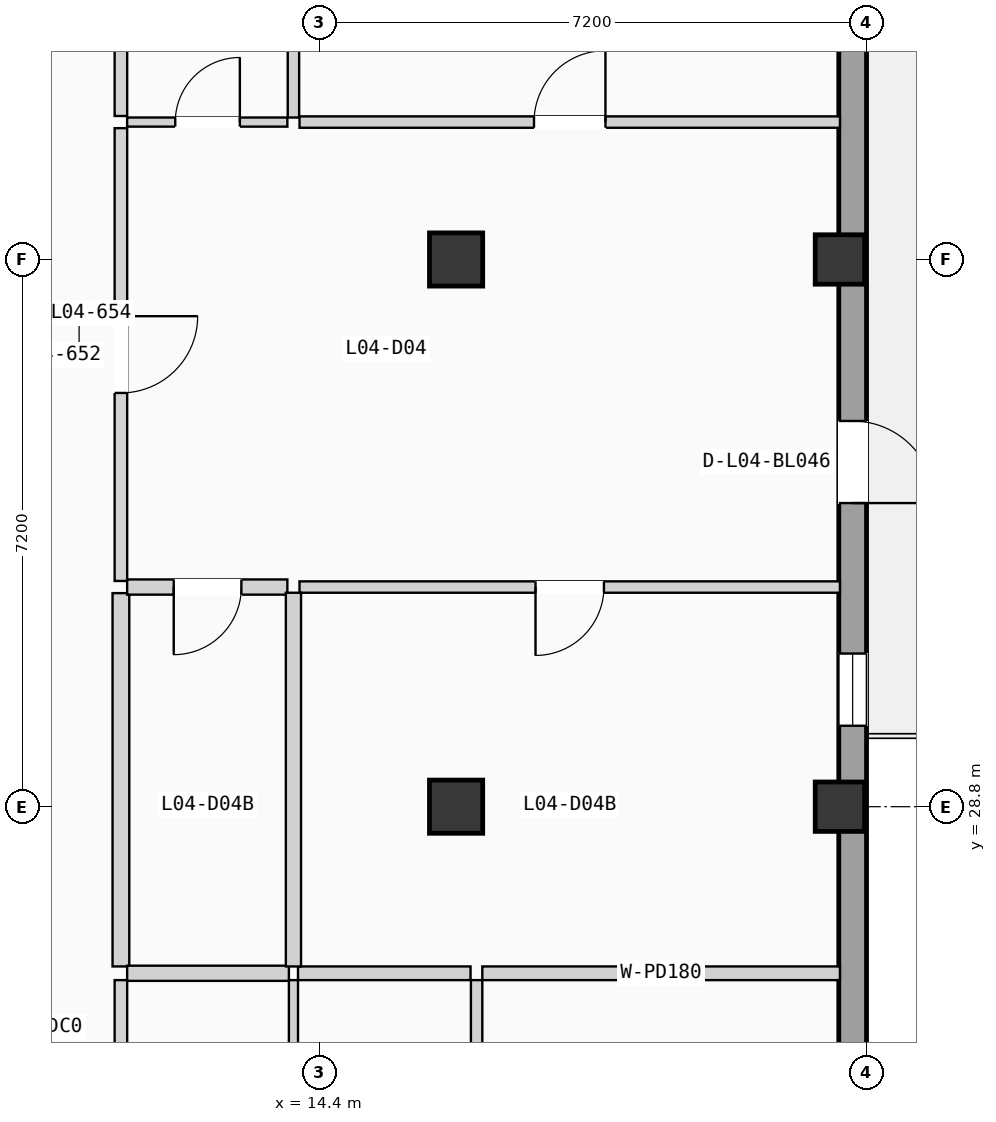
"""IFC4 building model, lengths in metres.
Left out: names, types, materials, properties, quantities, classifications, styles, units other than length and angle.
Written with IfcOpenShell. Run it as: python <this file> out.ifc"""

import sys

from ifc_helpers import new_model, si_unit, direction, frame, frame_2d, origin, origin_2d, place, context, subcontext, project, spatial, rectangle, extrude, element, fill, save


model = new_model("IFC4")
c1 = context("Model", 3, precision=1e-05, world=origin(), true_north=direction((0.0, 1.0)))
c2 = subcontext(c1, "Body", "Model", "MODEL_VIEW")
j1 = project(units=[si_unit("LENGTHUNIT", "METRE"), si_unit("PLANEANGLEUNIT", "RADIAN")], contexts=[c1])
p1 = place(None, origin())
s1 = spatial("IfcSite", under=j1, at=p1, CompositionType="ELEMENT")
p2 = place(p1, origin())
s2 = spatial("IfcBuilding", under=s1, at=p2, CompositionType="ELEMENT")
p3 = place(p2, frame((0.0, 0.0, 15.225)))
s3 = spatial("IfcBuildingStorey", under=s2, at=p3, CompositionType="ELEMENT", Elevation=15.225)
for number, where, z_axis, x_axis in (
    (1, (16.2, 28.8, 0.0), (0.0, 0.0, 1.0), (1.0, 0.0, 0.0)),
    (2, (16.2, 36.0, 0.0), (0.0, 0.0, 1.0), (1.0, 0.0, 0.0)),
):
    element("IfcColumn", number, at=place(p3, frame(where, z_axis=z_axis, x_axis=x_axis)), inside=s3, PredefinedType="COLUMN", context=c2, shape_type="SweptSolid", body=[
        extrude(rectangle(XDim=0.7, YDim=0.7, at=origin_2d()), origin(), (0.0, 0.0, 1.0), 3.15),
    ])
for number, where, z_axis, x_axis in (
    (3, (21.25, 28.8, 0.0), (0.0, 0.0, 1.0), (1.0, 0.0, 0.0)),
    (4, (21.25, 36.0, 0.0), (0.0, 0.0, 1.0), (1.0, 0.0, 0.0)),
):
    element("IfcColumn", number, at=place(p3, frame(where, z_axis=z_axis, x_axis=x_axis)), inside=s3, PredefinedType="COLUMN", context=c2, shape_type="SweptSolid", body=[
        extrude(rectangle(XDim=0.65, YDim=0.65, at=origin_2d()), origin(), (0.0, 0.0, 1.0), 3.15),
    ])
p4 = place(p3, frame((21.417, 0.365, 0.0), z_axis=(0.0, 0.0, 1.0), x_axis=(0.0, 1.0, 0.0)))
e5 = element("IfcWall", 5, at=p4, inside=s3, PredefinedType="SOLIDWALL", context=c2, shape_type="SweptSolid", body=[
    extrude(rectangle(XDim=49.67, YDim=0.365, at=frame_2d((24.835, 0.0))), origin(), (0.0, 0.0, 1.0), 2.89),
])
p5 = place(p4, frame((16.335, 0.0, 0.0)))
e6 = element("IfcOpeningElement", 6, at=p5, cuts=e5, PredefinedType="OPENING", context=c2, shape_type="SweptSolid", body=[
    extrude(rectangle(XDim=0.95, YDim=2.15, at=frame_2d((0.475, 1.075))), frame((0.0, 0.192, 0.0), z_axis=(0.0, -1.0, 0.0), x_axis=(1.0, 0.0, 0.0)), (0.0, 0.0, 1.0), 0.385),
])
p6 = place(p4, frame((9.053, 0.0, 0.9)))
e7 = element("IfcOpeningElement", 7, at=p6, cuts=e5, PredefinedType="OPENING", context=c2, shape_type="SweptSolid", body=[
    extrude(rectangle(XDim=2.15, YDim=1.2, at=frame_2d((1.075, 0.6))), frame((0.0, 0.192, 0.0), z_axis=(0.0, -1.0, 0.0), x_axis=(1.0, 0.0, 0.0)), (0.0, 0.0, 1.0), 0.385),
])
p7 = place(p4, frame((22.754, 0.0, 0.855)))
e8 = element("IfcOpeningElement", 8, at=p7, cuts=e5, PredefinedType="OPENING", context=c2, shape_type="SweptSolid", body=[
    extrude(rectangle(XDim=2.15, YDim=1.35, at=frame_2d((1.075, 0.675))), frame((0.0, 0.192, 0.0), z_axis=(0.0, -1.0, 0.0), x_axis=(1.0, 0.0, 0.0)), (0.0, 0.0, 1.0), 0.385),
])
p8 = place(p4, frame((32.43, 0.0, 0.0)))
e9 = element("IfcOpeningElement", 9, at=p8, cuts=e5, PredefinedType="OPENING", context=c2, shape_type="SweptSolid", body=[
    extrude(rectangle(XDim=1.08, YDim=2.18, at=frame_2d((0.54, 1.09))), frame((0.0, 0.192, 0.0), z_axis=(0.0, -1.0, 0.0), x_axis=(1.0, 0.0, 0.0)), (0.0, 0.0, 1.0), 0.385),
])
p9 = place(p4, frame((29.5, 0.0, 0.85)))
e10 = element("IfcOpeningElement", 10, at=p9, cuts=e5, PredefinedType="OPENING", context=c2, shape_type="SweptSolid", body=[
    extrude(rectangle(XDim=0.95, YDim=1.2, at=frame_2d((0.475, 0.6))), frame((0.0, 0.192, 0.0), z_axis=(0.0, -1.0, 0.0), x_axis=(1.0, 0.0, 0.0)), (0.0, 0.0, 1.0), 0.385),
])
p10 = place(p4, frame((38.904, 0.0, 0.555)))
e11 = element("IfcOpeningElement", 11, at=p10, cuts=e5, PredefinedType="OPENING", context=c2, shape_type="SweptSolid", body=[
    extrude(rectangle(XDim=2.15, YDim=1.65, at=frame_2d((1.075, 0.825))), frame((0.0, 0.192, 0.0), z_axis=(0.0, -1.0, 0.0), x_axis=(1.0, 0.0, 0.0)), (0.0, 0.0, 1.0), 0.385),
])
p11 = place(p3, frame((11.79, 20.733, 0.0), z_axis=(0.0, 0.0, 1.0), x_axis=(0.0, 1.0, 0.0)))
e12 = element("IfcWall", 12, at=p11, inside=s3, PredefinedType="PARTITIONING", context=c2, shape_type="SweptSolid", body=[
    extrude(rectangle(XDim=5.785, YDim=0.165, at=frame_2d((2.893, 0.0))), origin(), (0.0, 0.0, 1.0), 2.87),
])
p12 = place(p3, frame((11.79, 31.77, 0.0), z_axis=(0.0, 0.0, 1.0), x_axis=(0.0, 1.0, 0.0)))
e13 = element("IfcWall", 13, at=p12, inside=s3, PredefinedType="PARTITIONING", context=c2, shape_type="SweptSolid", body=[
    extrude(rectangle(XDim=5.958, YDim=0.165, at=frame_2d((2.979, 0.0))), origin(), (0.0, 0.0, 1.0), 2.87),
])
p13 = place(p12, frame((2.474, 0.0, 0.0)))
e14 = element("IfcOpeningElement", 14, at=p13, cuts=e13, PredefinedType="OPENING", context=c2, shape_type="SweptSolid", body=[
    extrude(rectangle(XDim=1.01, YDim=2.11, at=frame_2d((0.505, 1.055))), frame((0.0, 0.093, 0.0), z_axis=(0.0, -1.0, 0.0), x_axis=(1.0, 0.0, 0.0)), (0.0, 0.0, 1.0), 0.185),
])
p14 = place(p3, frame((11.79, 26.698, 0.0), z_axis=(0.0, 0.0, 1.0), x_axis=(0.0, 1.0, 0.0)))
e15 = element("IfcWall", 15, at=p14, inside=s3, PredefinedType="PLUMBINGWALL", context=c2, shape_type="SweptSolid", body=[
    extrude(rectangle(XDim=4.912, YDim=0.22, at=frame_2d((2.456, 0.0))), origin(), (0.0, 0.0, 1.0), 2.87),
])
p15 = place(p3, frame((11.79, 37.888, 0.0), z_axis=(0.0, 0.0, 1.0), x_axis=(0.0, 1.0, 0.0)))
e16 = element("IfcWall", 16, at=p15, inside=s3, PredefinedType="PARTITIONING", context=c2, shape_type="SweptSolid", body=[
    extrude(rectangle(XDim=4.912, YDim=0.165, at=frame_2d((2.456, 0.0))), origin(), (0.0, 0.0, 1.0), 2.87),
])
p16 = place(p3, frame((14.06, 20.713, 0.0), z_axis=(0.0, 0.0, 1.0), x_axis=(0.0, 1.0, 0.0)))
e17 = element("IfcWall", 17, at=p16, inside=s3, PredefinedType="PARTITIONING", context=c2, shape_type="SweptSolid", body=[
    extrude(rectangle(XDim=5.805, YDim=0.12, at=frame_2d((2.903, 0.0))), origin(), (0.0, 0.0, 1.0), 2.87),
])
p17 = place(p3, frame((11.872, 26.608, 0.0), z_axis=(0.0, 0.0, 1.0), x_axis=(1.0, 0.0, 0.0)))
e18 = element("IfcWall", 18, at=p17, inside=s3, PredefinedType="PLUMBINGWALL", context=c2, shape_type="SweptSolid", body=[
    extrude(rectangle(XDim=2.128, YDim=0.2, at=frame_2d((1.064, 0.0))), origin(), (0.0, 0.0, 1.0), 2.87),
])
p18 = place(p3, frame((16.47, 20.728, 0.0), z_axis=(0.0, 0.0, 1.0), x_axis=(0.0, 1.0, 0.0)))
e19 = element("IfcWall", 19, at=p18, inside=s3, PredefinedType="PARTITIONING", context=c2, shape_type="SweptSolid", body=[
    extrude(rectangle(XDim=5.79, YDim=0.15, at=frame_2d((2.895, 0.0))), origin(), (0.0, 0.0, 1.0), 2.87),
])
p19 = place(p3, frame((16.545, 26.608, 0.0), z_axis=(0.0, 0.0, 1.0), x_axis=(1.0, 0.0, 0.0)))
e20 = element("IfcWall", 20, at=p19, inside=s3, PredefinedType="PARTITIONING", context=c2, shape_type="SweptSolid", body=[
    extrude(rectangle(XDim=4.705, YDim=0.18, at=frame_2d((2.353, 0.0))), origin(), (0.0, 0.0, 1.0), 2.87),
])
p20 = place(p3, frame((14.12, 26.608, 0.0), z_axis=(0.0, 0.0, 1.0), x_axis=(1.0, 0.0, 0.0)))
e21 = element("IfcWall", 21, at=p20, inside=s3, PredefinedType="PARTITIONING", context=c2, shape_type="SweptSolid", body=[
    extrude(rectangle(XDim=2.27, YDim=0.18, at=frame_2d((1.135, 0.0))), origin(), (0.0, 0.0, 1.0), 2.87),
])
p21 = place(p3, frame((11.872, 31.69, 0.0), z_axis=(0.0, 0.0, 1.0), x_axis=(1.0, 0.0, 0.0)))
e22 = element("IfcWall", 22, at=p21, inside=s3, PredefinedType="PLUMBINGWALL", context=c2, shape_type="SweptSolid", body=[
    extrude(rectangle(XDim=2.108, YDim=0.2, at=frame_2d((1.054, 0.0))), origin(), (0.0, 0.0, 1.0), 2.87),
])
p22 = place(p21, frame((0.613, 0.0, 0.0)))
e23 = element("IfcOpeningElement", 23, at=p22, cuts=e22, PredefinedType="OPENING", context=c2, shape_type="SweptSolid", body=[
    extrude(rectangle(XDim=0.89, YDim=2.03, at=frame_2d((0.445, 1.015))), frame((0.0, 0.11, 0.0), z_axis=(0.0, -1.0, 0.0), x_axis=(1.0, 0.0, 0.0)), (0.0, 0.0, 1.0), 0.22),
])
p23 = place(p3, frame((11.872, 37.808, 0.0), z_axis=(0.0, 0.0, 1.0), x_axis=(1.0, 0.0, 0.0)))
e24 = element("IfcWall", 24, at=p23, inside=s3, PredefinedType="PARTITIONING", context=c2, shape_type="SweptSolid", body=[
    extrude(rectangle(XDim=2.108, YDim=0.12, at=frame_2d((1.054, 0.0))), origin(), (0.0, 0.0, 1.0), 2.87),
])
p24 = place(p23, frame((0.633, 0.0, 0.0)))
e25 = element("IfcOpeningElement", 25, at=p24, cuts=e24, PredefinedType="OPENING", context=c2, shape_type="SweptSolid", body=[
    extrude(rectangle(XDim=0.85, YDim=2.01, at=frame_2d((0.425, 1.005))), frame((0.0, 0.07, 0.0), z_axis=(0.0, -1.0, 0.0), x_axis=(1.0, 0.0, 0.0)), (0.0, 0.0, 1.0), 0.14),
])
p25 = place(p3, frame((14.14, 31.69, 0.0), z_axis=(0.0, 0.0, 1.0), x_axis=(1.0, 0.0, 0.0)))
e26 = element("IfcWall", 26, at=p25, inside=s3, PredefinedType="PARTITIONING", context=c2, shape_type="SweptSolid", body=[
    extrude(rectangle(XDim=7.11, YDim=0.15, at=frame_2d((3.555, 0.0))), origin(), (0.0, 0.0, 1.0), 2.87),
])
p26 = place(p25, frame((3.105, 0.0, 0.0)))
e27 = element("IfcOpeningElement", 27, at=p26, cuts=e26, PredefinedType="OPENING", context=c2, shape_type="SweptSolid", body=[
    extrude(rectangle(XDim=0.9, YDim=2.04, at=frame_2d((0.45, 1.02))), frame((0.0, 0.085, 0.0), z_axis=(0.0, -1.0, 0.0), x_axis=(1.0, 0.0, 0.0)), (0.0, 0.0, 1.0), 0.17),
])
p27 = place(p3, frame((14.14, 37.808, 0.0), z_axis=(0.0, 0.0, 1.0), x_axis=(1.0, 0.0, 0.0)))
e28 = element("IfcWall", 28, at=p27, inside=s3, PredefinedType="PARTITIONING", context=c2, shape_type="SweptSolid", body=[
    extrude(rectangle(XDim=7.11, YDim=0.15, at=frame_2d((3.555, 0.0))), origin(), (0.0, 0.0, 1.0), 2.87),
])
p28 = place(p27, frame((3.085, 0.0, 0.0)))
e29 = element("IfcOpeningElement", 29, at=p28, cuts=e28, PredefinedType="OPENING", context=c2, shape_type="SweptSolid", body=[
    extrude(rectangle(XDim=0.94, YDim=2.06, at=frame_2d((0.47, 1.03))), frame((0.0, 0.085, 0.0), z_axis=(0.0, -1.0, 0.0), x_axis=(1.0, 0.0, 0.0)), (0.0, 0.0, 1.0), 0.17),
])
p29 = place(p3, frame((14.06, 26.698, 0.0), z_axis=(0.0, 0.0, 1.0), x_axis=(0.0, 1.0, 0.0)))
e30 = element("IfcWall", 30, at=p29, inside=s3, PredefinedType="PLUMBINGWALL", context=c2, shape_type="SweptSolid", body=[
    extrude(rectangle(XDim=4.917, YDim=0.2, at=frame_2d((2.458, 0.0))), origin(), (0.0, 0.0, 1.0), 2.87),
])
p30 = place(p3, frame((14.06, 37.868, 0.0), z_axis=(0.0, 0.0, 1.0), x_axis=(0.0, 1.0, 0.0)))
e31 = element("IfcWall", 31, at=p30, inside=s3, PredefinedType="PARTITIONING", context=c2, shape_type="SweptSolid", body=[
    extrude(rectangle(XDim=4.932, YDim=0.15, at=frame_2d((2.466, 0.0))), origin(), (0.0, 0.0, 1.0), 2.87),
])
p31 = place(p8, frame((1.08, 0.0, 0.0), z_axis=(0.0, 0.0, 1.0), x_axis=(-1.0, 0.0, 0.0)))
e32 = element("IfcDoor", 32, at=p31, inside=s3, OperationType="SINGLE_SWING_LEFT", PredefinedType="DOOR", context=c2, shape_type="SweptSolid", body=[
    extrude(rectangle(XDim=1.08, YDim=2.18, at=frame_2d((0.54, 1.09))), frame((0.0, 0.025, 0.0), z_axis=(0.0, -1.0, 0.0), x_axis=(1.0, 0.0, 0.0)), (0.0, 0.0, 1.0), 0.05),
])
fill(e9, e32)
p32 = place(p9, origin())
e33 = element("IfcWindow", 33, at=p32, inside=s3, PartitioningType="SINGLE_PANEL", PredefinedType="WINDOW", context=c2, shape_type="SweptSolid", body=[
    extrude(rectangle(XDim=0.95, YDim=1.2, at=frame_2d((0.475, 0.6))), frame((0.0, 0.03, 0.0), z_axis=(0.0, -1.0, 0.0), x_axis=(1.0, 0.0, 0.0)), (0.0, 0.0, 1.0), 0.06),
])
fill(e10, e33)
p33 = place(p13, frame((1.01, 0.0, 0.0), z_axis=(0.0, 0.0, 1.0), x_axis=(-1.0, 0.0, 0.0)))
e34 = element("IfcDoor", 34, at=p33, inside=s3, OperationType="SINGLE_SWING_RIGHT", PredefinedType="DOOR", context=c2, shape_type="SweptSolid", body=[
    extrude(rectangle(XDim=1.01, YDim=2.11, at=frame_2d((0.505, 1.055))), frame((0.0, 0.025, 0.0), z_axis=(0.0, -1.0, 0.0), x_axis=(1.0, 0.0, 0.0)), (0.0, 0.0, 1.0), 0.05),
])
fill(e14, e34)
p34 = place(p22, frame((0.89, 0.0, 0.0), z_axis=(0.0, 0.0, 1.0), x_axis=(-1.0, 0.0, 0.0)))
e35 = element("IfcDoor", 35, at=p34, inside=s3, OperationType="SINGLE_SWING_LEFT", PredefinedType="DOOR", context=c2, shape_type="SweptSolid", body=[
    extrude(rectangle(XDim=0.89, YDim=2.03, at=frame_2d((0.445, 1.015))), frame((0.0, 0.025, 0.0), z_axis=(0.0, -1.0, 0.0), x_axis=(1.0, 0.0, 0.0)), (0.0, 0.0, 1.0), 0.05),
])
fill(e23, e35)
p35 = place(p24, origin())
e36 = element("IfcDoor", 36, at=p35, inside=s3, OperationType="SINGLE_SWING_RIGHT", PredefinedType="DOOR", context=c2, shape_type="SweptSolid", body=[
    extrude(rectangle(XDim=0.85, YDim=2.01, at=frame_2d((0.425, 1.005))), frame((0.0, 0.025, 0.0), z_axis=(0.0, -1.0, 0.0), x_axis=(1.0, 0.0, 0.0)), (0.0, 0.0, 1.0), 0.05),
])
fill(e25, e36)
p36 = place(p26, frame((0.9, 0.0, 0.0), z_axis=(0.0, 0.0, 1.0), x_axis=(-1.0, 0.0, 0.0)))
e37 = element("IfcDoor", 37, at=p36, inside=s3, OperationType="SINGLE_SWING_LEFT", PredefinedType="DOOR", context=c2, shape_type="SweptSolid", body=[
    extrude(rectangle(XDim=0.9, YDim=2.04, at=frame_2d((0.45, 1.02))), frame((0.0, 0.025, 0.0), z_axis=(0.0, -1.0, 0.0), x_axis=(1.0, 0.0, 0.0)), (0.0, 0.0, 1.0), 0.05),
])
fill(e27, e37)
p37 = place(p28, origin())
e38 = element("IfcDoor", 38, at=p37, inside=s3, OperationType="SINGLE_SWING_RIGHT", PredefinedType="DOOR", context=c2, shape_type="SweptSolid", body=[
    extrude(rectangle(XDim=0.94, YDim=2.06, at=frame_2d((0.47, 1.03))), frame((0.0, 0.025, 0.0), z_axis=(0.0, -1.0, 0.0), x_axis=(1.0, 0.0, 0.0)), (0.0, 0.0, 1.0), 0.05),
])
fill(e29, e38)
save(model, sys.argv[1])
